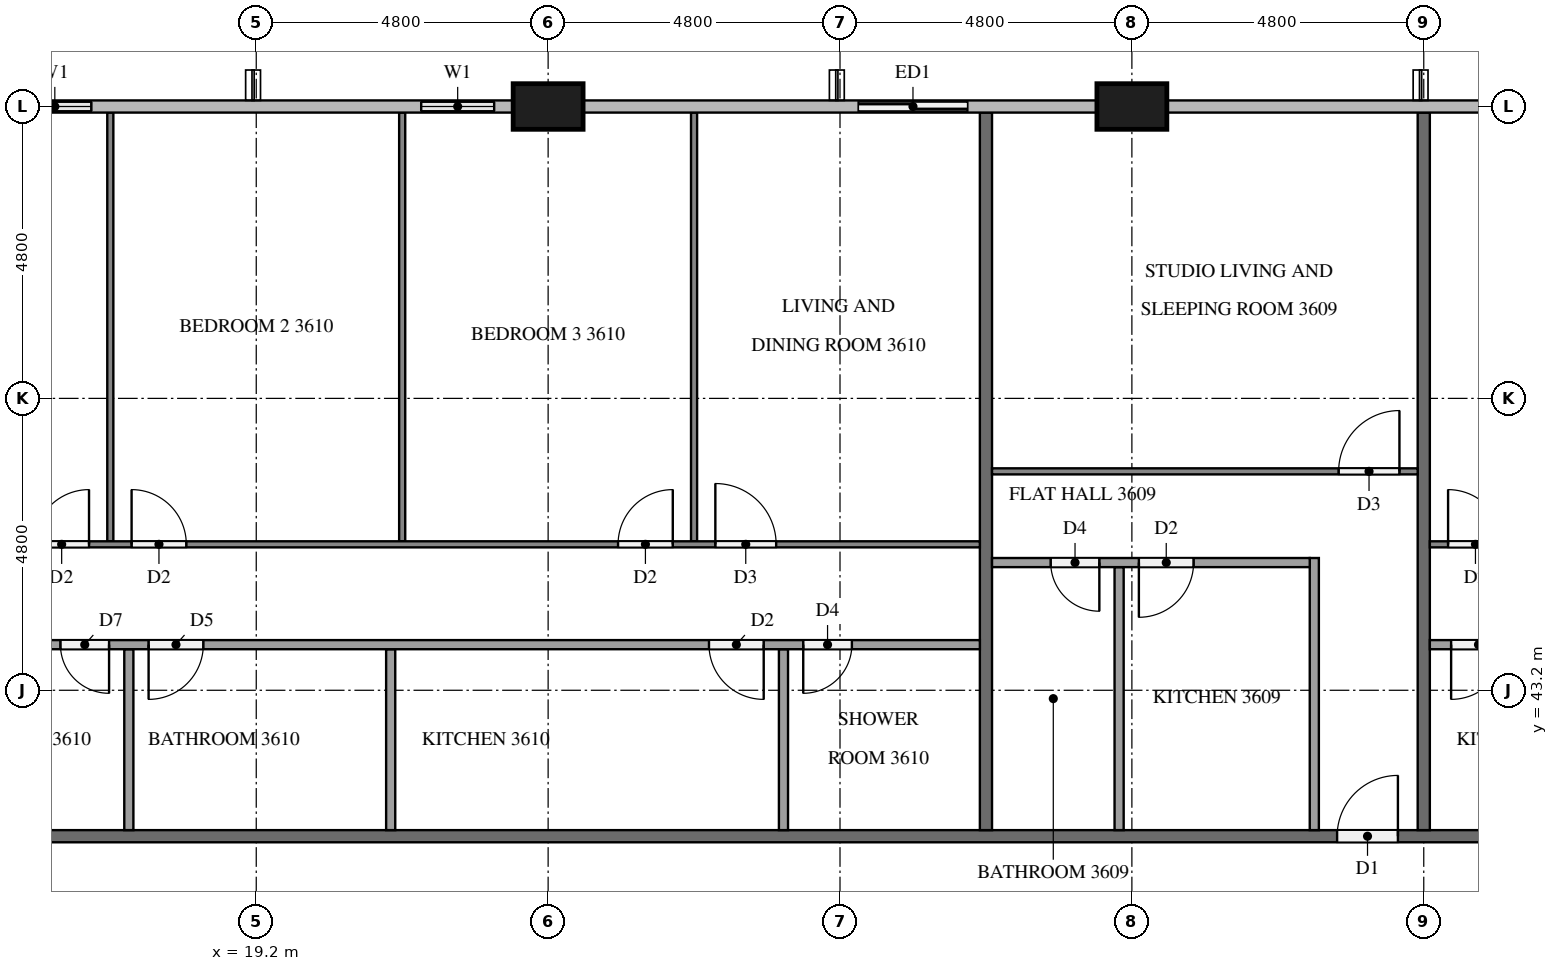
"""IFC4 building model, lengths in metres.
Left out: names, types, materials, properties, quantities, classifications, styles, units other than length and angle.
Written with IfcOpenShell. Run it as: python <this file> out.ifc"""

import sys

from ifc_helpers import new_model, si_unit, direction, frame, frame_2d, origin, origin_2d, place, context, subcontext, project, spatial, rectangle, extrude, element, fill, save


model = new_model("IFC4")
c1 = context("Model", 3, precision=1e-05, world=origin(), true_north=direction((0.0, 1.0)))
c2 = subcontext(c1, "Body", "Model", "MODEL_VIEW")
j1 = project(units=[si_unit("LENGTHUNIT", "METRE"), si_unit("PLANEANGLEUNIT", "RADIAN")], contexts=[c1])
p1 = place(None, origin())
s1 = spatial("IfcSite", under=j1, at=p1, CompositionType="ELEMENT")
p2 = place(p1, origin())
s2 = spatial("IfcBuilding", under=s1, at=p2, CompositionType="ELEMENT")
p3 = place(p2, frame((0.0, 0.0, 140.1)))
s3 = spatial("IfcBuildingStorey", under=s2, at=p3, CompositionType="ELEMENT", Elevation=140.1)
for number, where, z_axis, x_axis in (
    (1, (33.6, 52.8, 0.0), (0.0, 0.0, 1.0), (1.0, 0.0, 0.0)),
    (2, (24.0, 52.8, 0.0), (0.0, 0.0, 1.0), (1.0, 0.0, 0.0)),
):
    element("IfcColumn", number, at=place(p3, frame(where, z_axis=z_axis, x_axis=x_axis)), inside=s3, PredefinedType="COLUMN", context=c2, shape_type="SweptSolid", body=[
        extrude(rectangle(XDim=1.15, YDim=0.75, at=origin_2d()), origin(), (0.0, 0.0, 1.0), 3.1),
    ])
p4 = place(p3, frame((31.2, 52.8, 0.0), z_axis=(0.0, 0.0, 1.0), x_axis=(-1.0, 0.0, 0.0)))
e3 = element("IfcWall", 3, at=p4, inside=s3, PredefinedType="SOLIDWALL", context=c2, shape_type="SweptSolid", body=[
    extrude(rectangle(XDim=2.4, YDim=0.15, at=frame_2d((1.2, 0.0))), origin(), (0.0, 0.0, 1.0), 3.1),
])
p5 = place(p4, frame((0.3, 0.0, 0.0)))
e4 = element("IfcOpeningElement", 4, at=p5, cuts=e3, PredefinedType="OPENING", context=c2, shape_type="SweptSolid", body=[
    extrude(rectangle(XDim=1.8, YDim=2.4, at=frame_2d((0.9, 1.2))), frame((0.0, 0.085, 0.0), z_axis=(0.0, -1.0, 0.0), x_axis=(1.0, 0.0, 0.0)), (0.0, 0.0, 1.0), 0.17),
])
p6 = place(p3, frame((23.425, 52.8, 0.0), z_axis=(0.0, 0.0, 1.0), x_axis=(-1.0, 0.0, 0.0)))
e5 = element("IfcWall", 5, at=p6, inside=s3, PredefinedType="SOLIDWALL", context=c2, shape_type="SweptSolid", body=[
    extrude(rectangle(XDim=1.825, YDim=0.15, at=frame_2d((0.913, 0.0))), origin(), (0.0, 0.0, 1.0), 3.1),
])
p7 = place(p6, frame((0.312, 0.0, 0.9)))
e6 = element("IfcOpeningElement", 6, at=p7, cuts=e5, PredefinedType="OPENING", context=c2, shape_type="SweptSolid", body=[
    extrude(rectangle(XDim=1.2, YDim=1.4, at=frame_2d((0.6, 0.7))), frame((0.0, 0.085, 0.0), z_axis=(0.0, -1.0, 0.0), x_axis=(1.0, 0.0, 0.0)), (0.0, 0.0, 1.0), 0.17),
])
p8 = place(p3, frame((16.8, 52.8, 0.0), z_axis=(0.0, 0.0, 1.0), x_axis=(-1.0, 0.0, 0.0)))
e7 = element("IfcWall", 7, at=p8, inside=s3, PredefinedType="SOLIDWALL", context=c2, shape_type="SweptSolid", body=[
    extrude(rectangle(XDim=1.825, YDim=0.15, at=frame_2d((0.913, 0.0))), origin(), (0.0, 0.0, 1.0), 3.1),
])
p9 = place(p8, frame((0.312, 0.0, 0.9)))
e8 = element("IfcOpeningElement", 8, at=p9, cuts=e7, PredefinedType="OPENING", context=c2, shape_type="SweptSolid", body=[
    extrude(rectangle(XDim=1.2, YDim=1.4, at=frame_2d((0.6, 0.7))), frame((0.0, 0.085, 0.0), z_axis=(0.0, -1.0, 0.0), x_axis=(1.0, 0.0, 0.0)), (0.0, 0.0, 1.0), 0.17),
])
p10 = place(p3, frame((11.9, 40.8, 0.0), z_axis=(0.0, 0.0, 1.0), x_axis=(1.0, 0.0, 0.0)))
e9 = element("IfcWall", 9, at=p10, inside=s3, PredefinedType="PARTITIONING", context=c2, shape_type="SweptSolid", body=[
    extrude(rectangle(XDim=38.6, YDim=0.2, at=frame_2d((19.3, 0.0))), origin(), (0.0, 0.0, 1.0), 3.1),
])
p11 = place(p10, frame((37.075, 0.0, 0.0)))
e10 = element("IfcOpeningElement", 10, at=p11, cuts=e9, PredefinedType="OPENING", context=c2, shape_type="SweptSolid", body=[
    extrude(rectangle(XDim=1.0, YDim=2.1, at=frame_2d((0.5, 1.05))), frame((0.0, 0.11, 0.0), z_axis=(0.0, -1.0, 0.0), x_axis=(1.0, 0.0, 0.0)), (0.0, 0.0, 1.0), 0.22),
])
p12 = place(p10, frame((25.075, 0.0, 0.0)))
e11 = element("IfcOpeningElement", 11, at=p12, cuts=e9, PredefinedType="OPENING", context=c2, shape_type="SweptSolid", body=[
    extrude(rectangle(XDim=1.0, YDim=2.1, at=frame_2d((0.5, 1.05))), frame((0.0, 0.11, 0.0), z_axis=(0.0, -1.0, 0.0), x_axis=(1.0, 0.0, 0.0)), (0.0, 0.0, 1.0), 0.22),
])
p13 = place(p10, frame((0.475, 0.0, 0.0)))
e12 = element("IfcOpeningElement", 12, at=p13, cuts=e9, PredefinedType="OPENING", context=c2, shape_type="SweptSolid", body=[
    extrude(rectangle(XDim=1.1, YDim=2.1, at=frame_2d((0.55, 1.05))), frame((0.0, 0.11, 0.0), z_axis=(0.0, -1.0, 0.0), x_axis=(1.0, 0.0, 0.0)), (0.0, 0.0, 1.0), 0.22),
])
for number, where, z_axis, x_axis in (
    (13, (38.4, 52.7, 0.0), (0.0, 0.0, 1.0), (0.0, -1.0, 0.0)),
    (14, (31.2, 52.7, 0.0), (0.0, 0.0, 1.0), (0.0, -1.0, 0.0)),
):
    element("IfcWall", number, at=place(p3, frame(where, z_axis=z_axis, x_axis=x_axis)), inside=s3, PredefinedType="PARTITIONING", context=c2, shape_type="SweptSolid", body=[
        extrude(rectangle(XDim=11.8, YDim=0.2, at=frame_2d((5.9, 0.0))), origin(), (0.0, 0.0, 1.0), 3.1),
    ])
p14 = place(p3, frame((38.5, 45.6, 0.0), z_axis=(0.0, 0.0, 1.0), x_axis=(1.0, 0.0, 0.0)))
e15 = element("IfcWall", 15, at=p14, inside=s3, PredefinedType="PARTITIONING", context=c2, shape_type="SweptSolid", body=[
    extrude(rectangle(XDim=11.8, YDim=0.1, at=frame_2d((5.9, 0.0))), origin(), (0.0, 0.0, 1.0), 3.1),
])
p15 = place(p14, frame((10.5, 0.0, 0.0)))
e16 = element("IfcOpeningElement", 16, at=p15, cuts=e15, PredefinedType="OPENING", context=c2, shape_type="SweptSolid", body=[
    extrude(rectangle(XDim=1.0, YDim=2.1, at=frame_2d((0.5, 1.05))), frame((0.0, 0.06, 0.0), z_axis=(0.0, -1.0, 0.0), x_axis=(1.0, 0.0, 0.0)), (0.0, 0.0, 1.0), 0.12),
])
p16 = place(p14, frame((0.3, 0.0, 0.0)))
e17 = element("IfcOpeningElement", 17, at=p16, cuts=e15, PredefinedType="OPENING", context=c2, shape_type="SweptSolid", body=[
    extrude(rectangle(XDim=0.9, YDim=2.1, at=frame_2d((0.45, 1.05))), frame((0.0, 0.06, 0.0), z_axis=(0.0, -1.0, 0.0), x_axis=(1.0, 0.0, 0.0)), (0.0, 0.0, 1.0), 0.12),
])
p17 = place(p3, frame((48.525, 43.95, 0.0), z_axis=(0.0, 0.0, 1.0), x_axis=(-1.0, 0.0, 0.0)))
e18 = element("IfcWall", 18, at=p17, inside=s3, PredefinedType="PARTITIONING", context=c2, shape_type="SweptSolid", body=[
    extrude(rectangle(XDim=10.025, YDim=0.15, at=frame_2d((5.012, 0.0))), origin(), (0.0, 0.0, 1.0), 3.1),
])
p18 = place(p17, frame((0.3, 0.0, 0.0)))
e19 = element("IfcOpeningElement", 19, at=p18, cuts=e18, PredefinedType="OPENING", context=c2, shape_type="SweptSolid", body=[
    extrude(rectangle(XDim=0.8, YDim=2.1, at=frame_2d((0.4, 1.05))), frame((0.0, 0.085, 0.0), z_axis=(0.0, -1.0, 0.0), x_axis=(1.0, 0.0, 0.0)), (0.0, 0.0, 1.0), 0.17),
])
p19 = place(p17, frame((8.775, 0.0, 0.0)))
e20 = element("IfcOpeningElement", 20, at=p19, cuts=e18, PredefinedType="OPENING", context=c2, shape_type="SweptSolid", body=[
    extrude(rectangle(XDim=0.9, YDim=2.1, at=frame_2d((0.45, 1.05))), frame((0.0, 0.085, 0.0), z_axis=(0.0, -1.0, 0.0), x_axis=(1.0, 0.0, 0.0)), (0.0, 0.0, 1.0), 0.17),
])
p20 = place(p3, frame((31.3, 46.8, 0.0), z_axis=(0.0, 0.0, 1.0), x_axis=(1.0, 0.0, 0.0)))
e21 = element("IfcWall", 21, at=p20, inside=s3, PredefinedType="PARTITIONING", context=c2, shape_type="SweptSolid", body=[
    extrude(rectangle(XDim=7.0, YDim=0.1, at=frame_2d((3.5, 0.0))), origin(), (0.0, 0.0, 1.0), 3.1),
])
p21 = place(p20, frame((5.7, 0.0, 0.0)))
e22 = element("IfcOpeningElement", 22, at=p21, cuts=e21, PredefinedType="OPENING", context=c2, shape_type="SweptSolid", body=[
    extrude(rectangle(XDim=1.0, YDim=2.1, at=frame_2d((0.5, 1.05))), frame((0.0, 0.06, 0.0), z_axis=(0.0, -1.0, 0.0), x_axis=(1.0, 0.0, 0.0)), (0.0, 0.0, 1.0), 0.12),
])
p22 = place(p3, frame((33.39, 40.9, 0.0), z_axis=(0.0, 0.0, 1.0), x_axis=(0.0, 1.0, 0.0)))
e23 = element("IfcWall", 23, at=p22, inside=s3, PredefinedType="PARTITIONING", context=c2, shape_type="SweptSolid", body=[
    extrude(rectangle(XDim=4.325, YDim=0.15, at=frame_2d((2.163, 0.0))), origin(), (0.0, 0.0, 1.0), 3.1),
])
p23 = place(p3, frame((36.6, 40.9, 0.0), z_axis=(0.0, 0.0, 1.0), x_axis=(0.0, 1.0, 0.0)))
e24 = element("IfcWall", 24, at=p23, inside=s3, PredefinedType="PARTITIONING", context=c2, shape_type="SweptSolid", body=[
    extrude(rectangle(XDim=4.475, YDim=0.15, at=frame_2d((2.238, 0.0))), origin(), (0.0, 0.0, 1.0), 3.1),
])
p24 = place(p3, frame((36.525, 45.3, 0.0), z_axis=(0.0, 0.0, 1.0), x_axis=(-1.0, 0.0, 0.0)))
e25 = element("IfcWall", 25, at=p24, inside=s3, PredefinedType="PARTITIONING", context=c2, shape_type="SweptSolid", body=[
    extrude(rectangle(XDim=5.225, YDim=0.15, at=frame_2d((2.612, 0.0))), origin(), (0.0, 0.0, 1.0), 3.1),
])
p25 = place(p24, frame((1.91, 0.0, 0.0)))
e26 = element("IfcOpeningElement", 26, at=p25, cuts=e25, PredefinedType="OPENING", context=c2, shape_type="SweptSolid", body=[
    extrude(rectangle(XDim=0.9, YDim=2.1, at=frame_2d((0.45, 1.05))), frame((0.0, 0.085, 0.0), z_axis=(0.0, -1.0, 0.0), x_axis=(1.0, 0.0, 0.0)), (0.0, 0.0, 1.0), 0.17),
])
p26 = place(p24, frame((3.46, 0.0, 0.0)))
e27 = element("IfcOpeningElement", 27, at=p26, cuts=e25, PredefinedType="OPENING", context=c2, shape_type="SweptSolid", body=[
    extrude(rectangle(XDim=0.8, YDim=2.1, at=frame_2d((0.4, 1.05))), frame((0.0, 0.085, 0.0), z_axis=(0.0, -1.0, 0.0), x_axis=(1.0, 0.0, 0.0)), (0.0, 0.0, 1.0), 0.17),
])
for number, where, z_axis, x_axis in (
    (28, (16.8, 45.65, 0.0), (0.0, 0.0, 1.0), (0.0, 1.0, 0.0)),
    (29, (21.6, 45.65, 0.0), (0.0, 0.0, 1.0), (0.0, 1.0, 0.0)),
    (30, (26.4, 45.65, 0.0), (0.0, 0.0, 1.0), (0.0, 1.0, 0.0)),
):
    element("IfcWall", number, at=place(p3, frame(where, z_axis=z_axis, x_axis=x_axis)), inside=s3, PredefinedType="PARTITIONING", context=c2, shape_type="SweptSolid", body=[
        extrude(rectangle(XDim=7.05, YDim=0.1, at=frame_2d((3.525, 0.0))), origin(), (0.0, 0.0, 1.0), 3.1),
    ])
p27 = place(p3, frame((12.1, 45.6, 0.0), z_axis=(0.0, 0.0, 1.0), x_axis=(1.0, 0.0, 0.0)))
e31 = element("IfcWall", 31, at=p27, inside=s3, PredefinedType="PARTITIONING", context=c2, shape_type="SweptSolid", body=[
    extrude(rectangle(XDim=19.0, YDim=0.1, at=frame_2d((9.5, 0.0))), origin(), (0.0, 0.0, 1.0), 3.1),
])
p28 = place(p27, frame((3.45, 0.0, 0.0)))
e32 = element("IfcOpeningElement", 32, at=p28, cuts=e31, PredefinedType="OPENING", context=c2, shape_type="SweptSolid", body=[
    extrude(rectangle(XDim=0.9, YDim=2.1, at=frame_2d((0.45, 1.05))), frame((0.0, 0.06, 0.0), z_axis=(0.0, -1.0, 0.0), x_axis=(1.0, 0.0, 0.0)), (0.0, 0.0, 1.0), 0.12),
])
p29 = place(p27, frame((5.05, 0.0, 0.0)))
e33 = element("IfcOpeningElement", 33, at=p29, cuts=e31, PredefinedType="OPENING", context=c2, shape_type="SweptSolid", body=[
    extrude(rectangle(XDim=0.9, YDim=2.1, at=frame_2d((0.45, 1.05))), frame((0.0, 0.06, 0.0), z_axis=(0.0, -1.0, 0.0), x_axis=(1.0, 0.0, 0.0)), (0.0, 0.0, 1.0), 0.12),
])
p30 = place(p27, frame((13.05, 0.0, 0.0)))
e34 = element("IfcOpeningElement", 34, at=p30, cuts=e31, PredefinedType="OPENING", context=c2, shape_type="SweptSolid", body=[
    extrude(rectangle(XDim=0.9, YDim=2.1, at=frame_2d((0.45, 1.05))), frame((0.0, 0.06, 0.0), z_axis=(0.0, -1.0, 0.0), x_axis=(1.0, 0.0, 0.0)), (0.0, 0.0, 1.0), 0.12),
])
p31 = place(p27, frame((14.65, 0.0, 0.0)))
e35 = element("IfcOpeningElement", 35, at=p31, cuts=e31, PredefinedType="OPENING", context=c2, shape_type="SweptSolid", body=[
    extrude(rectangle(XDim=1.0, YDim=2.1, at=frame_2d((0.5, 1.05))), frame((0.0, 0.06, 0.0), z_axis=(0.0, -1.0, 0.0), x_axis=(1.0, 0.0, 0.0)), (0.0, 0.0, 1.0), 0.12),
])
for number, where, z_axis, x_axis in (
    (36, (17.105, 40.9, 0.0), (0.0, 0.0, 1.0), (0.0, 1.0, 0.0)),
    (37, (21.411, 40.9, 0.0), (0.0, 0.0, 1.0), (0.0, 1.0, 0.0)),
    (38, (27.87, 40.9, 0.0), (0.0, 0.0, 1.0), (0.0, 1.0, 0.0)),
):
    element("IfcWall", number, at=place(p3, frame(where, z_axis=z_axis, x_axis=x_axis)), inside=s3, PredefinedType="PARTITIONING", context=c2, shape_type="SweptSolid", body=[
        extrude(rectangle(XDim=2.975, YDim=0.15, at=frame_2d((1.488, 0.0))), origin(), (0.0, 0.0, 1.0), 3.1),
    ])
p32 = place(p3, frame((31.1, 43.95, 0.0), z_axis=(0.0, 0.0, 1.0), x_axis=(-1.0, 0.0, 0.0)))
e39 = element("IfcWall", 39, at=p32, inside=s3, PredefinedType="PARTITIONING", context=c2, shape_type="SweptSolid", body=[
    extrude(rectangle(XDim=17.225, YDim=0.15, at=frame_2d((8.613, 0.0))), origin(), (0.0, 0.0, 1.0), 3.1),
])
p33 = place(p32, frame((14.32, 0.0, 0.0)))
e40 = element("IfcOpeningElement", 40, at=p33, cuts=e39, PredefinedType="OPENING", context=c2, shape_type="SweptSolid", body=[
    extrude(rectangle(XDim=0.8, YDim=2.1, at=frame_2d((0.4, 1.05))), frame((0.0, 0.085, 0.0), z_axis=(0.0, -1.0, 0.0), x_axis=(1.0, 0.0, 0.0)), (0.0, 0.0, 1.0), 0.17),
])
p34 = place(p32, frame((12.77, 0.0, 0.0)))
e41 = element("IfcOpeningElement", 41, at=p34, cuts=e39, PredefinedType="OPENING", context=c2, shape_type="SweptSolid", body=[
    extrude(rectangle(XDim=0.9, YDim=2.1, at=frame_2d((0.45, 1.05))), frame((0.0, 0.085, 0.0), z_axis=(0.0, -1.0, 0.0), x_axis=(1.0, 0.0, 0.0)), (0.0, 0.0, 1.0), 0.17),
])
p35 = place(p32, frame((3.555, 0.0, 0.0)))
e42 = element("IfcOpeningElement", 42, at=p35, cuts=e39, PredefinedType="OPENING", context=c2, shape_type="SweptSolid", body=[
    extrude(rectangle(XDim=0.9, YDim=2.1, at=frame_2d((0.45, 1.05))), frame((0.0, 0.085, 0.0), z_axis=(0.0, -1.0, 0.0), x_axis=(1.0, 0.0, 0.0)), (0.0, 0.0, 1.0), 0.17),
])
p36 = place(p32, frame((2.105, 0.0, 0.0)))
e43 = element("IfcOpeningElement", 43, at=p36, cuts=e39, PredefinedType="OPENING", context=c2, shape_type="SweptSolid", body=[
    extrude(rectangle(XDim=0.8, YDim=2.1, at=frame_2d((0.4, 1.05))), frame((0.0, 0.085, 0.0), z_axis=(0.0, -1.0, 0.0), x_axis=(1.0, 0.0, 0.0)), (0.0, 0.0, 1.0), 0.17),
])
p37 = place(p5, origin())
e44 = element("IfcDoor", 44, at=p37, inside=s3, OperationType="SLIDING_TO_LEFT", PredefinedType="DOOR", context=c2, shape_type="SweptSolid", body=[
    extrude(rectangle(XDim=1.8, YDim=2.4, at=frame_2d((0.9, 1.2))), frame((0.0, 0.025, 0.0), z_axis=(0.0, -1.0, 0.0), x_axis=(1.0, 0.0, 0.0)), (0.0, 0.0, 1.0), 0.05),
])
fill(e4, e44)
p38 = place(p7, origin())
e45 = element("IfcWindow", 45, at=p38, inside=s3, PartitioningType="SINGLE_PANEL", PredefinedType="WINDOW", context=c2, shape_type="SweptSolid", body=[
    extrude(rectangle(XDim=1.2, YDim=1.4, at=frame_2d((0.6, 0.7))), frame((0.0, 0.03, 0.0), z_axis=(0.0, -1.0, 0.0), x_axis=(1.0, 0.0, 0.0)), (0.0, 0.0, 1.0), 0.06),
])
fill(e6, e45)
p39 = place(p9, origin())
e46 = element("IfcWindow", 46, at=p39, inside=s3, PartitioningType="SINGLE_PANEL", PredefinedType="WINDOW", context=c2, shape_type="SweptSolid", body=[
    extrude(rectangle(XDim=1.2, YDim=1.4, at=frame_2d((0.6, 0.7))), frame((0.0, 0.03, 0.0), z_axis=(0.0, -1.0, 0.0), x_axis=(1.0, 0.0, 0.0)), (0.0, 0.0, 1.0), 0.06),
])
fill(e8, e46)
p40 = place(p12, origin())
e47 = element("IfcDoor", 47, at=p40, inside=s3, OperationType="SINGLE_SWING_RIGHT", PredefinedType="DOOR", context=c2, shape_type="SweptSolid", body=[
    extrude(rectangle(XDim=1.0, YDim=2.1, at=frame_2d((0.5, 1.05))), frame((0.0, 0.025, 0.0), z_axis=(0.0, -1.0, 0.0), x_axis=(1.0, 0.0, 0.0)), (0.0, 0.0, 1.0), 0.05),
])
fill(e11, e47)
p41 = place(p16, origin())
e48 = element("IfcDoor", 48, at=p41, inside=s3, OperationType="SINGLE_SWING_LEFT", PredefinedType="DOOR", context=c2, shape_type="SweptSolid", body=[
    extrude(rectangle(XDim=0.9, YDim=2.1, at=frame_2d((0.45, 1.05))), frame((0.0, 0.025, 0.0), z_axis=(0.0, -1.0, 0.0), x_axis=(1.0, 0.0, 0.0)), (0.0, 0.0, 1.0), 0.05),
])
fill(e17, e48)
p42 = place(p19, origin())
e49 = element("IfcDoor", 49, at=p42, inside=s3, OperationType="SINGLE_SWING_RIGHT", PredefinedType="DOOR", context=c2, shape_type="SweptSolid", body=[
    extrude(rectangle(XDim=0.9, YDim=2.1, at=frame_2d((0.45, 1.05))), frame((0.0, 0.025, 0.0), z_axis=(0.0, -1.0, 0.0), x_axis=(1.0, 0.0, 0.0)), (0.0, 0.0, 1.0), 0.05),
])
fill(e20, e49)
p43 = place(p21, origin())
e50 = element("IfcDoor", 50, at=p43, inside=s3, OperationType="SINGLE_SWING_RIGHT", PredefinedType="DOOR", context=c2, shape_type="SweptSolid", body=[
    extrude(rectangle(XDim=1.0, YDim=2.1, at=frame_2d((0.5, 1.05))), frame((0.0, 0.025, 0.0), z_axis=(0.0, -1.0, 0.0), x_axis=(1.0, 0.0, 0.0)), (0.0, 0.0, 1.0), 0.05),
])
fill(e22, e50)
p44 = place(p25, origin())
e51 = element("IfcDoor", 51, at=p44, inside=s3, OperationType="SINGLE_SWING_RIGHT", PredefinedType="DOOR", context=c2, shape_type="SweptSolid", body=[
    extrude(rectangle(XDim=0.9, YDim=2.1, at=frame_2d((0.45, 1.05))), frame((0.0, 0.025, 0.0), z_axis=(0.0, -1.0, 0.0), x_axis=(1.0, 0.0, 0.0)), (0.0, 0.0, 1.0), 0.05),
])
fill(e26, e51)
p45 = place(p26, origin())
e52 = element("IfcDoor", 52, at=p45, inside=s3, OperationType="SINGLE_SWING_LEFT", PredefinedType="DOOR", context=c2, shape_type="SweptSolid", body=[
    extrude(rectangle(XDim=0.8, YDim=2.1, at=frame_2d((0.4, 1.05))), frame((0.0, 0.025, 0.0), z_axis=(0.0, -1.0, 0.0), x_axis=(1.0, 0.0, 0.0)), (0.0, 0.0, 1.0), 0.05),
])
fill(e27, e52)
p46 = place(p28, origin())
e53 = element("IfcDoor", 53, at=p46, inside=s3, OperationType="SINGLE_SWING_RIGHT", PredefinedType="DOOR", context=c2, shape_type="SweptSolid", body=[
    extrude(rectangle(XDim=0.9, YDim=2.1, at=frame_2d((0.45, 1.05))), frame((0.0, 0.025, 0.0), z_axis=(0.0, -1.0, 0.0), x_axis=(1.0, 0.0, 0.0)), (0.0, 0.0, 1.0), 0.05),
])
fill(e32, e53)
p47 = place(p29, origin())
e54 = element("IfcDoor", 54, at=p47, inside=s3, OperationType="SINGLE_SWING_LEFT", PredefinedType="DOOR", context=c2, shape_type="SweptSolid", body=[
    extrude(rectangle(XDim=0.9, YDim=2.1, at=frame_2d((0.45, 1.05))), frame((0.0, 0.025, 0.0), z_axis=(0.0, -1.0, 0.0), x_axis=(1.0, 0.0, 0.0)), (0.0, 0.0, 1.0), 0.05),
])
fill(e33, e54)
p48 = place(p30, origin())
e55 = element("IfcDoor", 55, at=p48, inside=s3, OperationType="SINGLE_SWING_RIGHT", PredefinedType="DOOR", context=c2, shape_type="SweptSolid", body=[
    extrude(rectangle(XDim=0.9, YDim=2.1, at=frame_2d((0.45, 1.05))), frame((0.0, 0.025, 0.0), z_axis=(0.0, -1.0, 0.0), x_axis=(1.0, 0.0, 0.0)), (0.0, 0.0, 1.0), 0.05),
])
fill(e34, e55)
p49 = place(p31, origin())
e56 = element("IfcDoor", 56, at=p49, inside=s3, OperationType="SINGLE_SWING_LEFT", PredefinedType="DOOR", context=c2, shape_type="SweptSolid", body=[
    extrude(rectangle(XDim=1.0, YDim=2.1, at=frame_2d((0.5, 1.05))), frame((0.0, 0.025, 0.0), z_axis=(0.0, -1.0, 0.0), x_axis=(1.0, 0.0, 0.0)), (0.0, 0.0, 1.0), 0.05),
])
fill(e35, e56)
p50 = place(p33, origin())
e57 = element("IfcDoor", 57, at=p50, inside=s3, OperationType="SINGLE_SWING_LEFT", PredefinedType="DOOR", context=c2, shape_type="SweptSolid", body=[
    extrude(rectangle(XDim=0.8, YDim=2.1, at=frame_2d((0.4, 1.05))), frame((0.0, 0.025, 0.0), z_axis=(0.0, -1.0, 0.0), x_axis=(1.0, 0.0, 0.0)), (0.0, 0.0, 1.0), 0.05),
])
fill(e40, e57)
p51 = place(p34, origin())
e58 = element("IfcDoor", 58, at=p51, inside=s3, OperationType="SINGLE_SWING_RIGHT", PredefinedType="DOOR", context=c2, shape_type="SweptSolid", body=[
    extrude(rectangle(XDim=0.9, YDim=2.1, at=frame_2d((0.45, 1.05))), frame((0.0, 0.025, 0.0), z_axis=(0.0, -1.0, 0.0), x_axis=(1.0, 0.0, 0.0)), (0.0, 0.0, 1.0), 0.05),
])
fill(e41, e58)
p52 = place(p35, origin())
e59 = element("IfcDoor", 59, at=p52, inside=s3, OperationType="SINGLE_SWING_LEFT", PredefinedType="DOOR", context=c2, shape_type="SweptSolid", body=[
    extrude(rectangle(XDim=0.9, YDim=2.1, at=frame_2d((0.45, 1.05))), frame((0.0, 0.025, 0.0), z_axis=(0.0, -1.0, 0.0), x_axis=(1.0, 0.0, 0.0)), (0.0, 0.0, 1.0), 0.05),
])
fill(e42, e59)
p53 = place(p36, origin())
e60 = element("IfcDoor", 60, at=p53, inside=s3, OperationType="SINGLE_SWING_RIGHT", PredefinedType="DOOR", context=c2, shape_type="SweptSolid", body=[
    extrude(rectangle(XDim=0.8, YDim=2.1, at=frame_2d((0.4, 1.05))), frame((0.0, 0.025, 0.0), z_axis=(0.0, -1.0, 0.0), x_axis=(1.0, 0.0, 0.0)), (0.0, 0.0, 1.0), 0.05),
])
fill(e43, e60)
save(model, sys.argv[1])
